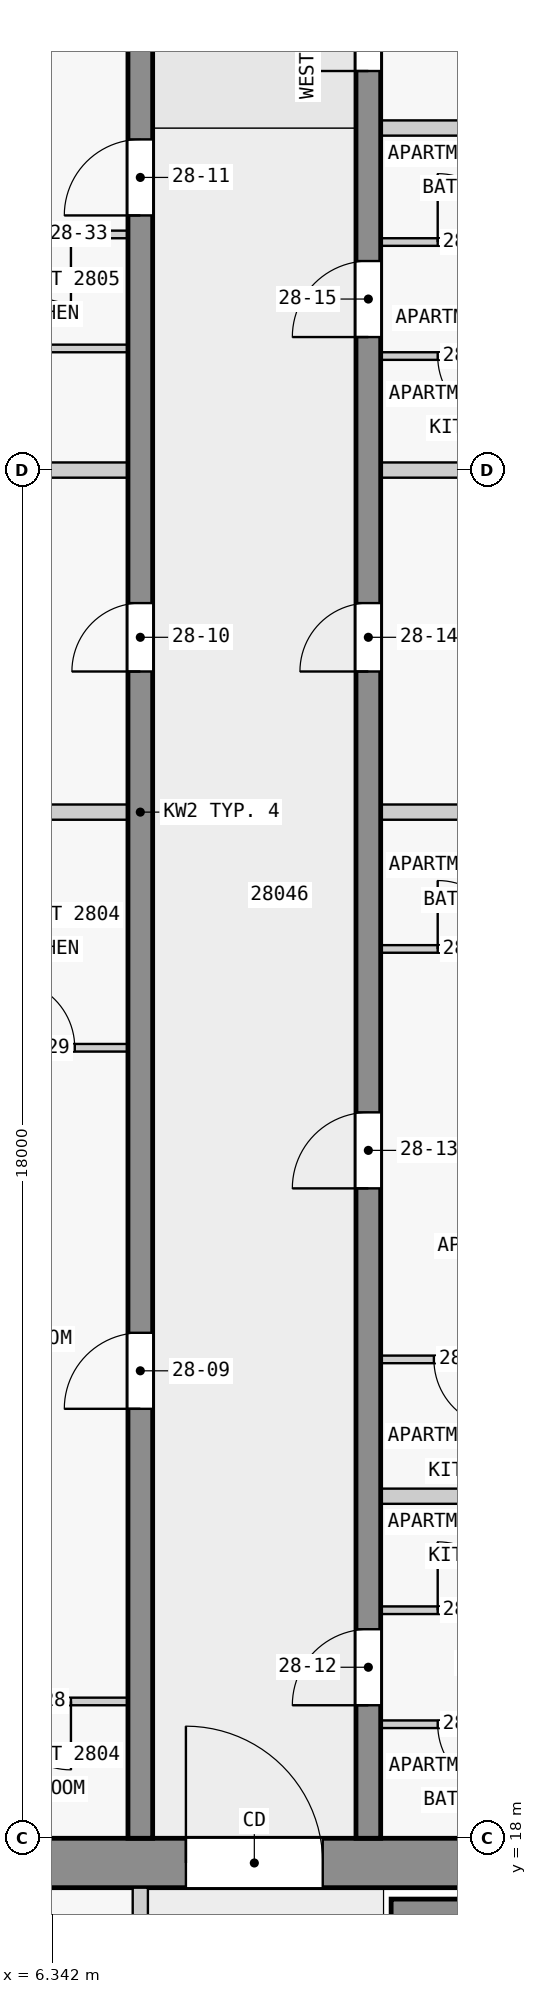
"""IFC4 building model, lengths in metres.
Left out: names, types, materials, properties, quantities, classifications, styles, units other than length and angle.
Written with IfcOpenShell. Run it as: python <this file> out.ifc"""

import sys

from ifc_helpers import new_model, si_unit, direction, frame, frame_2d, origin, place, context, subcontext, project, spatial, rectangle, extrude, element, fill, save


model = new_model("IFC4")
c1 = context("Model", 3, precision=1e-05, world=origin(), true_north=direction((0.0, 1.0)))
c2 = subcontext(c1, "Body", "Model", "MODEL_VIEW")
j1 = project(units=[si_unit("LENGTHUNIT", "METRE"), si_unit("PLANEANGLEUNIT", "RADIAN")], contexts=[c1])
p1 = place(None, origin())
s1 = spatial("IfcSite", under=j1, at=p1, CompositionType="ELEMENT")
p2 = place(p1, origin())
s2 = spatial("IfcBuilding", under=s1, at=p2, CompositionType="ELEMENT")
p3 = place(p2, frame((0.0, 0.0, 109.8)))
s3 = spatial("IfcBuildingStorey", under=s2, at=p3, CompositionType="ELEMENT", Elevation=109.8)
p4 = place(p3, frame((1.65, 17.675, 0.0), z_axis=(0.0, 0.0, 1.0), x_axis=(1.0, 0.0, 0.0)))
e1 = element("IfcWall", 1, at=p4, inside=s3, PredefinedType="SHEAR", context=c2, shape_type="SweptSolid", body=[
    extrude(rectangle(XDim=20.85, YDim=0.65, at=frame_2d((10.425, 0.0))), origin(), (0.0, 0.0, 1.0), 3.25),
])
p5 = place(p4, frame((6.45, 0.0, 0.0)))
e2 = element("IfcOpeningElement", 2, at=p5, cuts=e1, PredefinedType="OPENING", context=c2, shape_type="SweptSolid", body=[
    extrude(rectangle(XDim=1.8, YDim=2.1, at=frame_2d((0.9, 1.05))), frame((0.0, 0.335, 0.0), z_axis=(0.0, -1.0, 0.0), x_axis=(1.0, 0.0, 0.0)), (0.0, 0.0, 1.0), 0.67),
])
p6 = place(p3, frame((10.8, 17.05, 0.0), z_axis=(0.0, 0.0, 1.0), x_axis=(1.0, 0.0, 0.0)))
e3 = element("IfcWall", 3, at=p6, inside=s3, PredefinedType="SHEAR", context=c2, shape_type="SweptSolid", body=[
    extrude(rectangle(XDim=7.8, YDim=0.3, at=frame_2d((3.9, 0.0))), origin(), (0.0, 0.0, 1.0), 3.25),
])
p7 = place(p3, frame((7.5, 18.0, 0.0), z_axis=(0.0, 0.0, 1.0), x_axis=(0.0, 1.0, 0.0)))
e4 = element("IfcWall", 4, at=p7, inside=s3, PredefinedType="SHEAR", context=c2, shape_type="SweptSolid", body=[
    extrude(rectangle(XDim=27.0, YDim=0.325, at=frame_2d((13.5, 0.0))), origin(), (0.0, 0.0, 1.0), 3.25),
])
p8 = place(p7, frame((5.65, 0.0, 0.0)))
e5 = element("IfcOpeningElement", 5, at=p8, cuts=e4, PredefinedType="OPENING", context=c2, shape_type="SweptSolid", body=[
    extrude(rectangle(XDim=1.0, YDim=2.1, at=frame_2d((0.5, 1.05))), frame((0.0, 0.172, 0.0), z_axis=(0.0, -1.0, 0.0), x_axis=(1.0, 0.0, 0.0)), (0.0, 0.0, 1.0), 0.345),
])
p9 = place(p7, frame((15.35, 0.0, 0.0)))
e6 = element("IfcOpeningElement", 6, at=p9, cuts=e4, PredefinedType="OPENING", context=c2, shape_type="SweptSolid", body=[
    extrude(rectangle(XDim=0.9, YDim=2.1, at=frame_2d((0.45, 1.05))), frame((0.0, 0.172, 0.0), z_axis=(0.0, -1.0, 0.0), x_axis=(1.0, 0.0, 0.0)), (0.0, 0.0, 1.0), 0.345),
])
p10 = place(p7, frame((21.35, 0.0, 0.0)))
e7 = element("IfcOpeningElement", 7, at=p10, cuts=e4, PredefinedType="OPENING", context=c2, shape_type="SweptSolid", body=[
    extrude(rectangle(XDim=1.0, YDim=2.1, at=frame_2d((0.5, 1.05))), frame((0.0, 0.172, 0.0), z_axis=(0.0, -1.0, 0.0), x_axis=(1.0, 0.0, 0.0)), (0.0, 0.0, 1.0), 0.345),
])
p11 = place(p3, frame((10.5, 18.0, 0.0), z_axis=(0.0, 0.0, 1.0), x_axis=(0.0, 1.0, 0.0)))
e8 = element("IfcWall", 8, at=p11, inside=s3, PredefinedType="SHEAR", context=c2, shape_type="SweptSolid", body=[
    extrude(rectangle(XDim=27.0, YDim=0.325, at=frame_2d((13.5, 0.0))), origin(), (0.0, 0.0, 1.0), 3.25),
])
p12 = place(p11, frame((1.75, 0.0, 0.0)))
e9 = element("IfcOpeningElement", 9, at=p12, cuts=e8, PredefinedType="OPENING", context=c2, shape_type="SweptSolid", body=[
    extrude(rectangle(XDim=1.0, YDim=2.1, at=frame_2d((0.5, 1.05))), frame((0.0, 0.172, 0.0), z_axis=(0.0, -1.0, 0.0), x_axis=(1.0, 0.0, 0.0)), (0.0, 0.0, 1.0), 0.345),
])
p13 = place(p11, frame((8.55, 0.0, 0.0)))
e10 = element("IfcOpeningElement", 10, at=p13, cuts=e8, PredefinedType="OPENING", context=c2, shape_type="SweptSolid", body=[
    extrude(rectangle(XDim=1.0, YDim=2.1, at=frame_2d((0.5, 1.05))), frame((0.0, 0.172, 0.0), z_axis=(0.0, -1.0, 0.0), x_axis=(1.0, 0.0, 0.0)), (0.0, 0.0, 1.0), 0.345),
])
p14 = place(p11, frame((15.35, 0.0, 0.0)))
e11 = element("IfcOpeningElement", 11, at=p14, cuts=e8, PredefinedType="OPENING", context=c2, shape_type="SweptSolid", body=[
    extrude(rectangle(XDim=0.9, YDim=2.1, at=frame_2d((0.45, 1.05))), frame((0.0, 0.172, 0.0), z_axis=(0.0, -1.0, 0.0), x_axis=(1.0, 0.0, 0.0)), (0.0, 0.0, 1.0), 0.345),
])
p15 = place(p11, frame((19.75, 0.0, 0.0)))
e12 = element("IfcOpeningElement", 12, at=p15, cuts=e8, PredefinedType="OPENING", context=c2, shape_type="SweptSolid", body=[
    extrude(rectangle(XDim=1.0, YDim=2.1, at=frame_2d((0.5, 1.05))), frame((0.0, 0.172, 0.0), z_axis=(0.0, -1.0, 0.0), x_axis=(1.0, 0.0, 0.0)), (0.0, 0.0, 1.0), 0.345),
])
p16 = place(p11, frame((23.25, 0.0, 0.0)))
e13 = element("IfcOpeningElement", 13, at=p16, cuts=e8, PredefinedType="OPENING", context=c2, shape_type="SweptSolid", body=[
    extrude(rectangle(XDim=0.9, YDim=2.1, at=frame_2d((0.45, 1.05))), frame((0.0, 0.172, 0.0), z_axis=(0.0, -1.0, 0.0), x_axis=(1.0, 0.0, 0.0)), (0.0, 0.0, 1.0), 0.345),
])
p17 = place(p11, frame((25.45, 0.0, 0.0)))
e14 = element("IfcOpeningElement", 14, at=p17, cuts=e8, PredefinedType="OPENING", context=c2, shape_type="SweptSolid", body=[
    extrude(rectangle(XDim=1.0, YDim=2.1, at=frame_2d((0.5, 1.05))), frame((0.0, 0.172, 0.0), z_axis=(0.0, -1.0, 0.0), x_axis=(1.0, 0.0, 0.0)), (0.0, 0.0, 1.0), 0.345),
])
p18 = place(p3, frame((7.5, 10.1, 0.0), z_axis=(0.0, 0.0, 1.0), x_axis=(0.0, 1.0, 0.0)))
e15 = element("IfcWall", 15, at=p18, inside=s3, PredefinedType="PARTITIONING", context=c2, shape_type="SweptSolid", body=[
    extrude(rectangle(XDim=7.25, YDim=0.2, at=frame_2d((3.625, 0.0))), origin(), (0.0, 0.0, 1.0), 3.25),
])
p19 = place(p18, frame((0.775, 0.0, 0.0)))
e16 = element("IfcOpeningElement", 16, at=p19, cuts=e15, PredefinedType="OPENING", context=c2, shape_type="SweptSolid", body=[
    extrude(rectangle(XDim=0.9, YDim=2.1, at=frame_2d((0.45, 1.05))), frame((0.0, 0.11, 0.0), z_axis=(0.0, -1.0, 0.0), x_axis=(1.0, 0.0, 0.0)), (0.0, 0.0, 1.0), 0.22),
])
p20 = place(p18, frame((3.225, 0.0, 0.0)))
e17 = element("IfcOpeningElement", 17, at=p20, cuts=e15, PredefinedType="OPENING", context=c2, shape_type="SweptSolid", body=[
    extrude(rectangle(XDim=0.9, YDim=2.1, at=frame_2d((0.45, 1.05))), frame((0.0, 0.11, 0.0), z_axis=(0.0, -1.0, 0.0), x_axis=(1.0, 0.0, 0.0)), (0.0, 0.0, 1.0), 0.22),
])
p21 = place(p18, frame((5.25, 0.0, 0.0)))
e18 = element("IfcOpeningElement", 18, at=p21, cuts=e15, PredefinedType="OPENING", context=c2, shape_type="SweptSolid", body=[
    extrude(rectangle(XDim=0.9, YDim=2.1, at=frame_2d((0.45, 1.05))), frame((0.0, 0.11, 0.0), z_axis=(0.0, -1.0, 0.0), x_axis=(1.0, 0.0, 0.0)), (0.0, 0.0, 1.0), 0.22),
])
p22 = place(p3, frame((13.062, 19.5, 0.0), z_axis=(0.0, 0.0, 1.0), x_axis=(-1.0, 0.0, 0.0)))
e19 = element("IfcWall", 19, at=p22, inside=s3, PredefinedType="PARTITIONING", context=c2, shape_type="SweptSolid", body=[
    extrude(rectangle(XDim=2.4, YDim=0.1, at=frame_2d((1.2, 0.0))), origin(), (0.0, 0.0, 1.0), 3.25),
])
p23 = place(p22, frame((0.75, 0.0, 0.0)))
e20 = element("IfcOpeningElement", 20, at=p23, cuts=e19, PredefinedType="OPENING", context=c2, shape_type="SweptSolid", body=[
    extrude(rectangle(XDim=0.9, YDim=2.1, at=frame_2d((0.45, 1.05))), frame((0.0, 0.06, 0.0), z_axis=(0.0, -1.0, 0.0), x_axis=(1.0, 0.0, 0.0)), (0.0, 0.0, 1.0), 0.12),
])
p24 = place(p3, frame((7.337, 19.8, 0.0), z_axis=(0.0, 0.0, 1.0), x_axis=(-1.0, 0.0, 0.0)))
e21 = element("IfcWall", 21, at=p24, inside=s3, PredefinedType="PARTITIONING", context=c2, shape_type="SweptSolid", body=[
    extrude(rectangle(XDim=2.35, YDim=0.1, at=frame_2d((1.175, 0.0))), origin(), (0.0, 0.0, 1.0), 3.25),
])
p25 = place(p24, frame((0.75, 0.0, 0.0)))
e22 = element("IfcOpeningElement", 22, at=p25, cuts=e21, PredefinedType="OPENING", context=c2, shape_type="SweptSolid", body=[
    extrude(rectangle(XDim=0.9, YDim=2.1, at=frame_2d((0.45, 1.05))), frame((0.0, 0.06, 0.0), z_axis=(0.0, -1.0, 0.0), x_axis=(1.0, 0.0, 0.0)), (0.0, 0.0, 1.0), 0.12),
])
p26 = place(p3, frame((10.663, 21.0, 0.0), z_axis=(0.0, 0.0, 1.0), x_axis=(1.0, 0.0, 0.0)))
e23 = element("IfcWall", 23, at=p26, inside=s3, PredefinedType="PARTITIONING", context=c2, shape_type="SweptSolid", body=[
    extrude(rectangle(XDim=2.35, YDim=0.1, at=frame_2d((1.175, 0.0))), origin(), (0.0, 0.0, 1.0), 3.25),
])
p27 = place(p26, frame((0.75, 0.0, 0.0)))
e24 = element("IfcOpeningElement", 24, at=p27, cuts=e23, PredefinedType="OPENING", context=c2, shape_type="SweptSolid", body=[
    extrude(rectangle(XDim=0.9, YDim=2.1, at=frame_2d((0.45, 1.05))), frame((0.0, 0.06, 0.0), z_axis=(0.0, -1.0, 0.0), x_axis=(1.0, 0.0, 0.0)), (0.0, 0.0, 1.0), 0.12),
])
p28 = place(p3, frame((12.962, 22.5, 0.0), z_axis=(0.0, 0.0, 1.0), x_axis=(-1.0, 0.0, 0.0)))
e25 = element("IfcWall", 25, at=p28, inside=s3, PredefinedType="PARTITIONING", context=c2, shape_type="SweptSolid", body=[
    extrude(rectangle(XDim=2.3, YDim=0.2, at=frame_2d((1.15, 0.0))), origin(), (0.0, 0.0, 1.0), 3.25),
])
p29 = place(p3, frame((13.012, 24.3, 0.0), z_axis=(0.0, 0.0, 1.0), x_axis=(-1.0, 0.0, 0.0)))
e26 = element("IfcWall", 26, at=p29, inside=s3, PredefinedType="PARTITIONING", context=c2, shape_type="SweptSolid", body=[
    extrude(rectangle(XDim=2.35, YDim=0.1, at=frame_2d((1.175, 0.0))), origin(), (0.0, 0.0, 1.0), 3.25),
])
p30 = place(p29, frame((0.75, 0.0, 0.0)))
e27 = element("IfcOpeningElement", 27, at=p30, cuts=e26, PredefinedType="OPENING", context=c2, shape_type="SweptSolid", body=[
    extrude(rectangle(XDim=0.9, YDim=2.1, at=frame_2d((0.45, 1.05))), frame((0.0, 0.06, 0.0), z_axis=(0.0, -1.0, 0.0), x_axis=(1.0, 0.0, 0.0)), (0.0, 0.0, 1.0), 0.12),
])
p31 = place(p3, frame((4.988, 28.4, 0.0), z_axis=(0.0, 0.0, 1.0), x_axis=(1.0, 0.0, 0.0)))
e28 = element("IfcWall", 28, at=p31, inside=s3, PredefinedType="PARTITIONING", context=c2, shape_type="SweptSolid", body=[
    extrude(rectangle(XDim=2.35, YDim=0.1, at=frame_2d((1.175, 0.0))), origin(), (0.0, 0.0, 1.0), 3.25),
])
p32 = place(p31, frame((0.75, 0.0, 0.0)))
e29 = element("IfcOpeningElement", 29, at=p32, cuts=e28, PredefinedType="OPENING", context=c2, shape_type="SweptSolid", body=[
    extrude(rectangle(XDim=0.9, YDim=2.1, at=frame_2d((0.45, 1.05))), frame((0.0, 0.06, 0.0), z_axis=(0.0, -1.0, 0.0), x_axis=(1.0, 0.0, 0.0)), (0.0, 0.0, 1.0), 0.12),
])
p33 = place(p3, frame((10.663, 29.7, 0.0), z_axis=(0.0, 0.0, 1.0), x_axis=(1.0, 0.0, 0.0)))
e30 = element("IfcWall", 30, at=p33, inside=s3, PredefinedType="PARTITIONING", context=c2, shape_type="SweptSolid", body=[
    extrude(rectangle(XDim=2.35, YDim=0.1, at=frame_2d((1.175, 0.0))), origin(), (0.0, 0.0, 1.0), 3.25),
])
p34 = place(p33, frame((0.75, 0.0, 0.0)))
e31 = element("IfcOpeningElement", 31, at=p34, cuts=e30, PredefinedType="OPENING", context=c2, shape_type="SweptSolid", body=[
    extrude(rectangle(XDim=0.9, YDim=2.1, at=frame_2d((0.45, 1.05))), frame((0.0, 0.06, 0.0), z_axis=(0.0, -1.0, 0.0), x_axis=(1.0, 0.0, 0.0)), (0.0, 0.0, 1.0), 0.12),
])
for number, where, z_axis, x_axis in (
    (32, (7.337, 31.5, 0.0), (0.0, 0.0, 1.0), (-1.0, 0.0, 0.0)),
    (33, (18.08, 31.5, 0.0), (0.0, 0.0, 1.0), (-1.0, 0.0, 0.0)),
):
    element("IfcWall", number, at=place(p3, frame(where, z_axis=z_axis, x_axis=x_axis)), inside=s3, PredefinedType="PARTITIONING", context=c2, shape_type="SweptSolid", body=[
        extrude(rectangle(XDim=7.417, YDim=0.2, at=frame_2d((3.709, 0.0))), origin(), (0.0, 0.0, 1.0), 3.25),
    ])
for number, where, z_axis, x_axis in (
    (34, (7.337, 36.0, 0.0), (0.0, 0.0, 1.0), (-1.0, 0.0, 0.0)),
    (35, (16.6, 36.0, 0.0), (0.0, 0.0, 1.0), (-1.0, 0.0, 0.0)),
):
    element("IfcWall", number, at=place(p3, frame(where, z_axis=z_axis, x_axis=x_axis)), inside=s3, PredefinedType="PARTITIONING", context=c2, shape_type="SweptSolid", body=[
        extrude(rectangle(XDim=5.938, YDim=0.2, at=frame_2d((2.969, 0.0))), origin(), (0.0, 0.0, 1.0), 3.25),
    ])
p35 = place(p3, frame((13.062, 37.5, 0.0), z_axis=(0.0, 0.0, 1.0), x_axis=(-1.0, 0.0, 0.0)))
e36 = element("IfcWall", 36, at=p35, inside=s3, PredefinedType="PARTITIONING", context=c2, shape_type="SweptSolid", body=[
    extrude(rectangle(XDim=2.4, YDim=0.1, at=frame_2d((1.2, 0.0))), origin(), (0.0, 0.0, 1.0), 3.25),
])
p36 = place(p35, frame((0.75, 0.0, 0.0)))
e37 = element("IfcOpeningElement", 37, at=p36, cuts=e36, PredefinedType="OPENING", context=c2, shape_type="SweptSolid", body=[
    extrude(rectangle(XDim=0.9, YDim=2.1, at=frame_2d((0.45, 1.05))), frame((0.0, 0.06, 0.0), z_axis=(0.0, -1.0, 0.0), x_axis=(1.0, 0.0, 0.0)), (0.0, 0.0, 1.0), 0.12),
])
p37 = place(p3, frame((7.337, 37.6, 0.0), z_axis=(0.0, 0.0, 1.0), x_axis=(-1.0, 0.0, 0.0)))
e38 = element("IfcWall", 38, at=p37, inside=s3, PredefinedType="PARTITIONING", context=c2, shape_type="SweptSolid", body=[
    extrude(rectangle(XDim=2.35, YDim=0.1, at=frame_2d((1.175, 0.0))), origin(), (0.0, 0.0, 1.0), 3.25),
])
p38 = place(p3, frame((10.663, 39.0, 0.0), z_axis=(0.0, 0.0, 1.0), x_axis=(1.0, 0.0, 0.0)))
e39 = element("IfcWall", 39, at=p38, inside=s3, PredefinedType="PARTITIONING", context=c2, shape_type="SweptSolid", body=[
    extrude(rectangle(XDim=2.4, YDim=0.1, at=frame_2d((1.2, 0.0))), origin(), (0.0, 0.0, 1.0), 3.25),
])
p39 = place(p38, frame((0.75, 0.0, 0.0)))
e40 = element("IfcOpeningElement", 40, at=p39, cuts=e39, PredefinedType="OPENING", context=c2, shape_type="SweptSolid", body=[
    extrude(rectangle(XDim=0.9, YDim=2.1, at=frame_2d((0.45, 1.05))), frame((0.0, 0.06, 0.0), z_axis=(0.0, -1.0, 0.0), x_axis=(1.0, 0.0, 0.0)), (0.0, 0.0, 1.0), 0.12),
])
p40 = place(p3, frame((7.337, 39.1, 0.0), z_axis=(0.0, 0.0, 1.0), x_axis=(-1.0, 0.0, 0.0)))
e41 = element("IfcWall", 41, at=p40, inside=s3, PredefinedType="PARTITIONING", context=c2, shape_type="SweptSolid", body=[
    extrude(rectangle(XDim=2.35, YDim=0.1, at=frame_2d((1.175, 0.0))), origin(), (0.0, 0.0, 1.0), 3.25),
])
p41 = place(p40, frame((0.75, 0.0, 0.0)))
e42 = element("IfcOpeningElement", 42, at=p41, cuts=e41, PredefinedType="OPENING", context=c2, shape_type="SweptSolid", body=[
    extrude(rectangle(XDim=0.9, YDim=2.1, at=frame_2d((0.45, 1.05))), frame((0.0, 0.06, 0.0), z_axis=(0.0, -1.0, 0.0), x_axis=(1.0, 0.0, 0.0)), (0.0, 0.0, 1.0), 0.12),
])
p42 = place(p3, frame((12.962, 40.5, 0.0), z_axis=(0.0, 0.0, 1.0), x_axis=(-1.0, 0.0, 0.0)))
e43 = element("IfcWall", 43, at=p42, inside=s3, PredefinedType="PARTITIONING", context=c2, shape_type="SweptSolid", body=[
    extrude(rectangle(XDim=2.3, YDim=0.2, at=frame_2d((1.15, 0.0))), origin(), (0.0, 0.0, 1.0), 3.25),
])
p43 = place(p5, origin())
e44 = element("IfcDoor", 44, at=p43, inside=s3, OperationType="DOUBLE_DOOR_SINGLE_SWING", PredefinedType="DOOR", context=c2, shape_type="SweptSolid", body=[
    extrude(rectangle(XDim=1.8, YDim=2.1, at=frame_2d((0.9, 1.05))), frame((0.0, 0.025, 0.0), z_axis=(0.0, -1.0, 0.0), x_axis=(1.0, 0.0, 0.0)), (0.0, 0.0, 1.0), 0.05),
])
fill(e2, e44)
p44 = place(p8, origin())
e45 = element("IfcDoor", 45, at=p44, inside=s3, OperationType="SINGLE_SWING_LEFT", PredefinedType="DOOR", context=c2, shape_type="SweptSolid", body=[
    extrude(rectangle(XDim=1.0, YDim=2.1, at=frame_2d((0.5, 1.05))), frame((0.0, 0.025, 0.0), z_axis=(0.0, -1.0, 0.0), x_axis=(1.0, 0.0, 0.0)), (0.0, 0.0, 1.0), 0.05),
])
fill(e5, e45)
p45 = place(p9, origin())
e46 = element("IfcDoor", 46, at=p45, inside=s3, OperationType="SINGLE_SWING_RIGHT", PredefinedType="DOOR", context=c2, shape_type="SweptSolid", body=[
    extrude(rectangle(XDim=0.9, YDim=2.1, at=frame_2d((0.45, 1.05))), frame((0.0, 0.025, 0.0), z_axis=(0.0, -1.0, 0.0), x_axis=(1.0, 0.0, 0.0)), (0.0, 0.0, 1.0), 0.05),
])
fill(e6, e46)
p46 = place(p10, origin())
e47 = element("IfcDoor", 47, at=p46, inside=s3, OperationType="SINGLE_SWING_RIGHT", PredefinedType="DOOR", context=c2, shape_type="SweptSolid", body=[
    extrude(rectangle(XDim=1.0, YDim=2.1, at=frame_2d((0.5, 1.05))), frame((0.0, 0.025, 0.0), z_axis=(0.0, -1.0, 0.0), x_axis=(1.0, 0.0, 0.0)), (0.0, 0.0, 1.0), 0.05),
])
fill(e7, e47)
p47 = place(p12, origin())
e48 = element("IfcDoor", 48, at=p47, inside=s3, OperationType="SINGLE_SWING_LEFT", PredefinedType="DOOR", context=c2, shape_type="SweptSolid", body=[
    extrude(rectangle(XDim=1.0, YDim=2.1, at=frame_2d((0.5, 1.05))), frame((0.0, 0.025, 0.0), z_axis=(0.0, -1.0, 0.0), x_axis=(1.0, 0.0, 0.0)), (0.0, 0.0, 1.0), 0.05),
])
fill(e9, e48)
p48 = place(p13, origin())
e49 = element("IfcDoor", 49, at=p48, inside=s3, OperationType="SINGLE_SWING_LEFT", PredefinedType="DOOR", context=c2, shape_type="SweptSolid", body=[
    extrude(rectangle(XDim=1.0, YDim=2.1, at=frame_2d((0.5, 1.05))), frame((0.0, 0.025, 0.0), z_axis=(0.0, -1.0, 0.0), x_axis=(1.0, 0.0, 0.0)), (0.0, 0.0, 1.0), 0.05),
])
fill(e10, e49)
p49 = place(p14, origin())
e50 = element("IfcDoor", 50, at=p49, inside=s3, OperationType="SINGLE_SWING_RIGHT", PredefinedType="DOOR", context=c2, shape_type="SweptSolid", body=[
    extrude(rectangle(XDim=0.9, YDim=2.1, at=frame_2d((0.45, 1.05))), frame((0.0, 0.025, 0.0), z_axis=(0.0, -1.0, 0.0), x_axis=(1.0, 0.0, 0.0)), (0.0, 0.0, 1.0), 0.05),
])
fill(e11, e50)
p50 = place(p15, origin())
e51 = element("IfcDoor", 51, at=p50, inside=s3, OperationType="SINGLE_SWING_RIGHT", PredefinedType="DOOR", context=c2, shape_type="SweptSolid", body=[
    extrude(rectangle(XDim=1.0, YDim=2.1, at=frame_2d((0.5, 1.05))), frame((0.0, 0.025, 0.0), z_axis=(0.0, -1.0, 0.0), x_axis=(1.0, 0.0, 0.0)), (0.0, 0.0, 1.0), 0.05),
])
fill(e12, e51)
p51 = place(p16, origin())
e52 = element("IfcDoor", 52, at=p51, inside=s3, OperationType="SINGLE_SWING_RIGHT", PredefinedType="DOOR", context=c2, shape_type="SweptSolid", body=[
    extrude(rectangle(XDim=0.9, YDim=2.1, at=frame_2d((0.45, 1.05))), frame((0.0, 0.025, 0.0), z_axis=(0.0, -1.0, 0.0), x_axis=(1.0, 0.0, 0.0)), (0.0, 0.0, 1.0), 0.05),
])
fill(e13, e52)
p52 = place(p25, origin())
e53 = element("IfcDoor", 53, at=p52, inside=s3, OperationType="SINGLE_SWING_RIGHT", PredefinedType="DOOR", context=c2, shape_type="SweptSolid", body=[
    extrude(rectangle(XDim=0.9, YDim=2.1, at=frame_2d((0.45, 1.05))), frame((0.0, 0.025, 0.0), z_axis=(0.0, -1.0, 0.0), x_axis=(1.0, 0.0, 0.0)), (0.0, 0.0, 1.0), 0.05),
])
fill(e22, e53)
p53 = place(p32, origin())
e54 = element("IfcDoor", 54, at=p53, inside=s3, OperationType="SINGLE_SWING_RIGHT", PredefinedType="DOOR", context=c2, shape_type="SweptSolid", body=[
    extrude(rectangle(XDim=0.9, YDim=2.1, at=frame_2d((0.45, 1.05))), frame((0.0, 0.025, 0.0), z_axis=(0.0, -1.0, 0.0), x_axis=(1.0, 0.0, 0.0)), (0.0, 0.0, 1.0), 0.05),
])
fill(e29, e54)
p54 = place(p41, origin())
e55 = element("IfcDoor", 55, at=p54, inside=s3, OperationType="SINGLE_SWING_RIGHT", PredefinedType="DOOR", context=c2, shape_type="SweptSolid", body=[
    extrude(rectangle(XDim=0.9, YDim=2.1, at=frame_2d((0.45, 1.05))), frame((0.0, 0.025, 0.0), z_axis=(0.0, -1.0, 0.0), x_axis=(1.0, 0.0, 0.0)), (0.0, 0.0, 1.0), 0.05),
])
fill(e42, e55)
p55 = place(p23, origin())
e56 = element("IfcDoor", 56, at=p55, inside=s3, OperationType="SINGLE_SWING_LEFT", PredefinedType="DOOR", context=c2, shape_type="SweptSolid", body=[
    extrude(rectangle(XDim=0.9, YDim=2.1, at=frame_2d((0.45, 1.05))), frame((0.0, 0.025, 0.0), z_axis=(0.0, -1.0, 0.0), x_axis=(1.0, 0.0, 0.0)), (0.0, 0.0, 1.0), 0.05),
])
fill(e20, e56)
p56 = place(p27, origin())
e57 = element("IfcDoor", 57, at=p56, inside=s3, OperationType="SINGLE_SWING_RIGHT", PredefinedType="DOOR", context=c2, shape_type="SweptSolid", body=[
    extrude(rectangle(XDim=0.9, YDim=2.1, at=frame_2d((0.45, 1.05))), frame((0.0, 0.025, 0.0), z_axis=(0.0, -1.0, 0.0), x_axis=(1.0, 0.0, 0.0)), (0.0, 0.0, 1.0), 0.05),
])
fill(e24, e57)
p57 = place(p30, origin())
e58 = element("IfcDoor", 58, at=p57, inside=s3, OperationType="SINGLE_SWING_RIGHT", PredefinedType="DOOR", context=c2, shape_type="SweptSolid", body=[
    extrude(rectangle(XDim=0.9, YDim=2.1, at=frame_2d((0.45, 1.05))), frame((0.0, 0.025, 0.0), z_axis=(0.0, -1.0, 0.0), x_axis=(1.0, 0.0, 0.0)), (0.0, 0.0, 1.0), 0.05),
])
fill(e27, e58)
p58 = place(p34, origin())
e59 = element("IfcDoor", 59, at=p58, inside=s3, OperationType="SINGLE_SWING_RIGHT", PredefinedType="DOOR", context=c2, shape_type="SweptSolid", body=[
    extrude(rectangle(XDim=0.9, YDim=2.1, at=frame_2d((0.45, 1.05))), frame((0.0, 0.025, 0.0), z_axis=(0.0, -1.0, 0.0), x_axis=(1.0, 0.0, 0.0)), (0.0, 0.0, 1.0), 0.05),
])
fill(e31, e59)
p59 = place(p36, origin())
e60 = element("IfcDoor", 60, at=p59, inside=s3, OperationType="SINGLE_SWING_LEFT", PredefinedType="DOOR", context=c2, shape_type="SweptSolid", body=[
    extrude(rectangle(XDim=0.9, YDim=2.1, at=frame_2d((0.45, 1.05))), frame((0.0, 0.025, 0.0), z_axis=(0.0, -1.0, 0.0), x_axis=(1.0, 0.0, 0.0)), (0.0, 0.0, 1.0), 0.05),
])
fill(e37, e60)
p60 = place(p39, origin())
e61 = element("IfcDoor", 61, at=p60, inside=s3, OperationType="SINGLE_SWING_LEFT", PredefinedType="DOOR", context=c2, shape_type="SweptSolid", body=[
    extrude(rectangle(XDim=0.9, YDim=2.1, at=frame_2d((0.45, 1.05))), frame((0.0, 0.025, 0.0), z_axis=(0.0, -1.0, 0.0), x_axis=(1.0, 0.0, 0.0)), (0.0, 0.0, 1.0), 0.05),
])
fill(e40, e61)
save(model, sys.argv[1])
